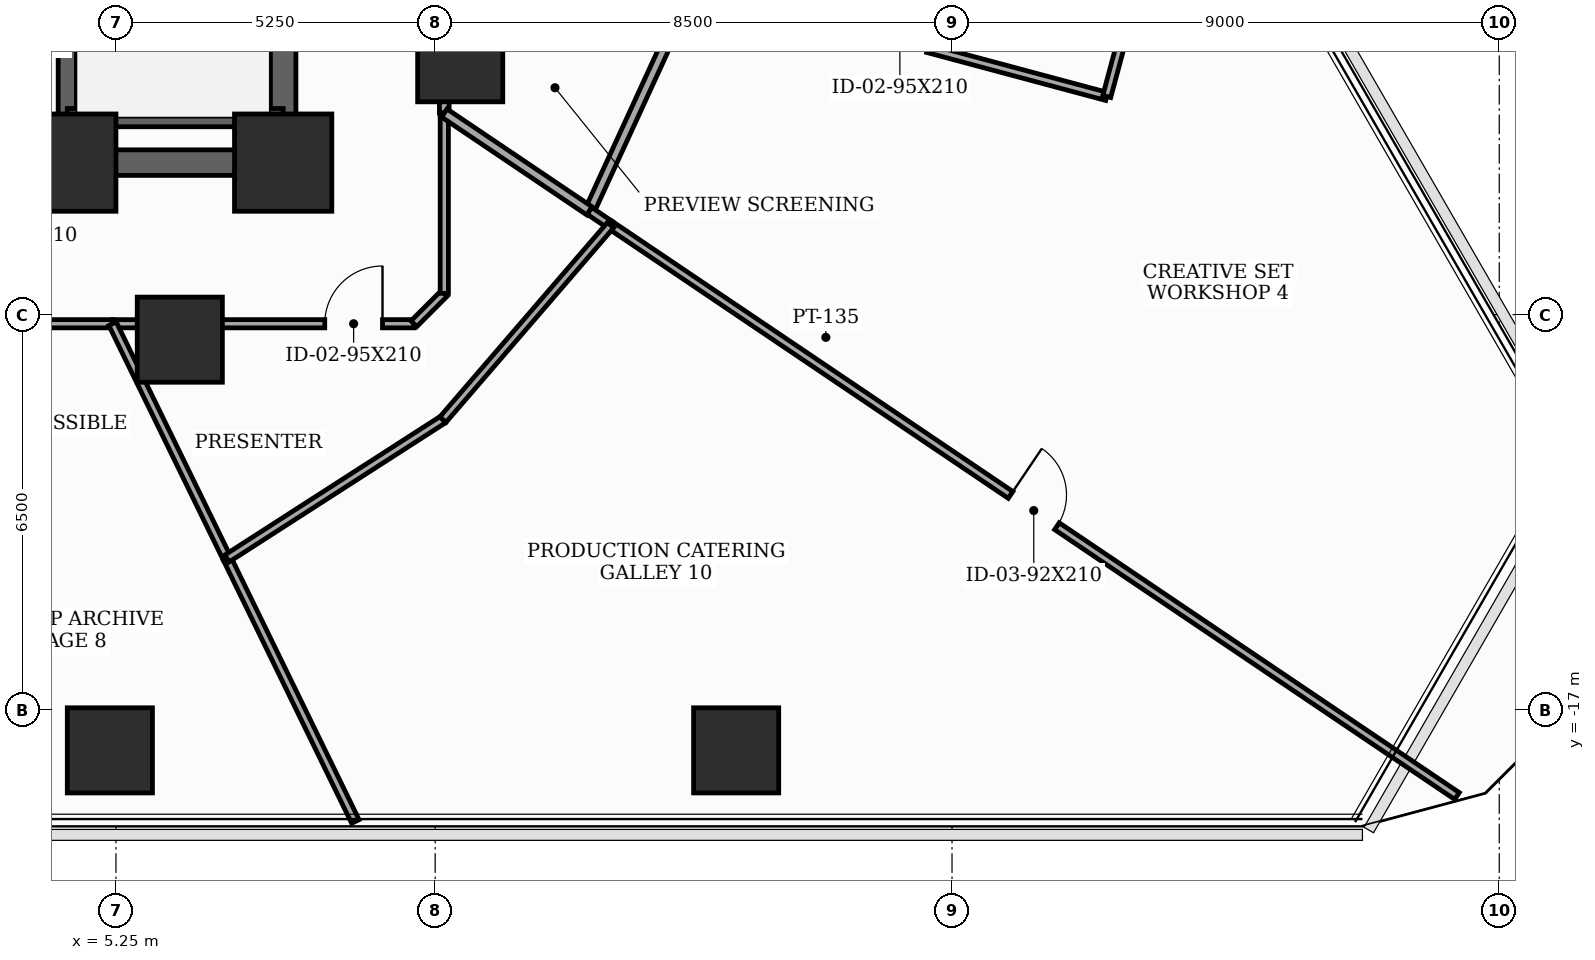
"""IFC4 building model, lengths in metres.
Left out: names, types, materials, properties, quantities, classifications, styles, units other than length and angle.
Written with IfcOpenShell. Run it as: python <this file> out.ifc"""

import sys

from ifc_helpers import new_model, si_unit, direction, frame, frame_2d, origin, origin_2d, place, context, subcontext, project, spatial, rectangle, extrude, element, fill, save


model = new_model("IFC4")
c1 = context("Model", 3, precision=1e-05, world=origin(), true_north=direction((0.0, 1.0)))
c2 = subcontext(c1, "Body", "Model", "MODEL_VIEW")
j1 = project(units=[si_unit("LENGTHUNIT", "METRE"), si_unit("PLANEANGLEUNIT", "RADIAN")], contexts=[c1])
p1 = place(None, origin())
s1 = spatial("IfcSite", under=j1, at=p1, CompositionType="ELEMENT")
p2 = place(p1, origin())
s2 = spatial("IfcBuilding", under=s1, at=p2, CompositionType="ELEMENT")
p3 = place(p2, frame((0.0, 0.0, 40.8)))
s3 = spatial("IfcBuildingStorey", under=s2, at=p3, CompositionType="ELEMENT", Elevation=40.8)
for number, where, z_axis, x_axis in (
    (1, (4.45, -8.0, 0.0), (0.0, 0.0, 1.0), (1.0, 0.0, 0.0)),
    (2, (8.0, -8.0, 0.0), (0.0, 0.0, 1.0), (1.0, 0.0, 0.0)),
):
    element("IfcColumn", number, at=place(p3, frame(where, z_axis=z_axis, x_axis=x_axis)), inside=s3, PredefinedType="COLUMN", context=c2, shape_type="SweptSolid", body=[
        extrude(rectangle(XDim=1.6, YDim=1.6, at=origin_2d()), origin(), (0.0, 0.0, 1.0), 3.7),
    ])
for number, where, z_axis, x_axis in (
    (3, (6.3, -10.912, 0.0), (0.0, 0.0, 1.0), (1.0, 0.0, 0.0)),
    (4, (10.912, -6.3, 0.0), (0.0, 0.0, 1.0), (1.0, 0.0, 0.0)),
    (5, (5.15, -17.667, 0.0), (0.0, 0.0, 1.0), (1.0, 0.0, 0.0)),
    (6, (15.45, -17.667, 0.0), (0.0, 0.0, 1.0), (1.0, 0.0, 0.0)),
):
    element("IfcColumn", number, at=place(p3, frame(where, z_axis=z_axis, x_axis=x_axis)), inside=s3, PredefinedType="COLUMN", context=c2, shape_type="SweptSolid", body=[
        extrude(rectangle(XDim=1.4, YDim=1.4, at=origin_2d()), origin(), (0.0, 0.0, 1.0), 3.7),
    ])
p4 = place(p3, frame((8.0, -8.0, 0.0), z_axis=(0.0, 0.0, 1.0), x_axis=(0.0, 1.0, 0.0)))
e7 = element("IfcWall", 7, at=p4, inside=s3, PredefinedType="SHEAR", context=c2, shape_type="SweptSolid", body=[
    extrude(rectangle(XDim=16.0, YDim=0.42, at=frame_2d((8.0, 0.0))), origin(), (0.0, 0.0, 1.0), 3.5),
])
p5 = place(p4, frame((9.6, 0.0, 0.0)))
e8 = element("IfcOpeningElement", 8, at=p5, cuts=e7, PredefinedType="OPENING", context=c2, shape_type="SweptSolid", body=[
    extrude(rectangle(XDim=1.05, YDim=2.15, at=frame_2d((0.525, 1.075))), frame((0.0, 0.22, 0.0), z_axis=(0.0, -1.0, 0.0), x_axis=(1.0, 0.0, 0.0)), (0.0, 0.0, 1.0), 0.44),
])
p6 = place(p4, frame((14.148, 0.0, 0.0)))
e9 = element("IfcOpeningElement", 9, at=p6, cuts=e7, PredefinedType="OPENING", context=c2, shape_type="SweptSolid", body=[
    extrude(rectangle(XDim=0.85, YDim=2.02, at=frame_2d((0.425, 1.01))), frame((0.0, 0.22, 0.0), z_axis=(0.0, -1.0, 0.0), x_axis=(1.0, 0.0, 0.0)), (0.0, 0.0, 1.0), 0.44),
])
p7 = place(p3, frame((-8.0, -8.0, 0.0), z_axis=(0.0, 0.0, 1.0), x_axis=(1.0, 0.0, 0.0)))
e10 = element("IfcWall", 10, at=p7, inside=s3, PredefinedType="SHEAR", context=c2, shape_type="SweptSolid", body=[
    extrude(rectangle(XDim=16.0, YDim=0.42, at=frame_2d((8.0, 0.0))), origin(), (0.0, 0.0, 1.0), 3.5),
])
p8 = place(p7, frame((4.6, 0.0, 0.0)))
e11 = element("IfcOpeningElement", 11, at=p8, cuts=e10, PredefinedType="OPENING", context=c2, shape_type="SweptSolid", body=[
    extrude(rectangle(XDim=0.95, YDim=2.1, at=frame_2d((0.475, 1.05))), frame((0.0, 0.22, 0.0), z_axis=(0.0, -1.0, 0.0), x_axis=(1.0, 0.0, 0.0)), (0.0, 0.0, 1.0), 0.44),
])
p9 = place(p7, frame((7.52, 0.0, 0.0)))
e12 = element("IfcOpeningElement", 12, at=p9, cuts=e10, PredefinedType="OPENING", context=c2, shape_type="SweptSolid", body=[
    extrude(rectangle(XDim=0.95, YDim=2.1, at=frame_2d((0.475, 1.05))), frame((0.0, 0.22, 0.0), z_axis=(0.0, -1.0, 0.0), x_axis=(1.0, 0.0, 0.0)), (0.0, 0.0, 1.0), 0.44),
])
p10 = place(p7, frame((10.45, 0.0, 0.0)))
e13 = element("IfcOpeningElement", 13, at=p10, cuts=e10, PredefinedType="OPENING", context=c2, shape_type="SweptSolid", body=[
    extrude(rectangle(XDim=0.95, YDim=2.1, at=frame_2d((0.475, 1.05))), frame((0.0, 0.22, 0.0), z_axis=(0.0, -1.0, 0.0), x_axis=(1.0, 0.0, 0.0)), (0.0, 0.0, 1.0), 0.44),
])
p11 = place(p3, frame((4.45, -7.79, 0.0), z_axis=(0.0, 0.0, 1.0), x_axis=(0.0, 1.0, 0.0)))
e14 = element("IfcWall", 14, at=p11, inside=s3, PredefinedType="SHEAR", context=c2, shape_type="SweptSolid", body=[
    extrude(rectangle(XDim=15.58, YDim=0.3, at=frame_2d((7.79, 0.0))), origin(), (0.0, 0.0, 1.0), 3.5),
])
p12 = place(p3, frame((4.45, -7.26, 0.0), z_axis=(0.0, 0.0, 1.0), x_axis=(1.0, 0.0, 0.0)))
e15 = element("IfcWall", 15, at=p12, inside=s3, PredefinedType="SHEAR", context=c2, shape_type="SweptSolid", body=[
    extrude(rectangle(XDim=3.55, YDim=0.3, at=frame_2d((1.775, 0.0))), origin(), (0.0, 0.0, 1.0), 3.5),
])
p13 = place(p3, frame((10.65, -7.184, 0.0), z_axis=(0.0, 0.0, 1.0), x_axis=(0.0, 1.0, 0.0)))
e16 = element("IfcWall", 16, at=p13, inside=s3, PredefinedType="PARTITIONING", context=c2, shape_type="SweptSolid", body=[
    extrude(rectangle(XDim=3.192, YDim=0.16, at=frame_2d((1.596, 0.0))), origin(), (0.0, 0.0, 1.0), 2.785),
])
p14 = place(p3, frame((14.74, -5.088, 0.0), z_axis=(0.0, 0.0, 1.0), x_axis=(0.965895912523, -0.258930659002, 0.0)))
e17 = element("IfcWall", 17, at=p14, inside=s3, PredefinedType="PARTITIONING", context=c2, shape_type="SweptSolid", body=[
    extrude(rectangle(XDim=7.045, YDim=0.135, at=frame_2d((3.522, 0.0))), origin(), (0.0, 0.0, 1.0), 2.935),
])
p15 = place(p14, frame((3.048, 0.0, 0.0)))
e18 = element("IfcOpeningElement", 18, at=p15, cuts=e17, PredefinedType="OPENING", context=c2, shape_type="SweptSolid", body=[
    extrude(rectangle(XDim=0.95, YDim=2.1, at=frame_2d((0.475, 1.05))), frame((0.0, 0.077, 0.0), z_axis=(0.0, -1.0, 0.0), x_axis=(1.0, 0.0, 0.0)), (0.0, 0.0, 1.0), 0.155),
])
p16 = place(p3, frame((21.545, -6.912, 0.0), z_axis=(0.0, 0.0, 1.0), x_axis=(0.259105843213, 0.965848933329, 0.0)))
e19 = element("IfcWall", 19, at=p16, inside=s3, PredefinedType="PARTITIONING", context=c2, shape_type="SweptSolid", body=[
    extrude(rectangle(XDim=2.2, YDim=0.135, at=frame_2d((1.1, 0.0))), origin(), (0.0, 0.0, 1.0), 2.935),
])
p17 = place(p3, frame((2.45, -10.65, 0.0), z_axis=(0.0, 0.0, 1.0), x_axis=(1.0, 0.0, 0.0)))
e20 = element("IfcWall", 20, at=p17, inside=s3, PredefinedType="PARTITIONING", context=c2, shape_type="SweptSolid", body=[
    extrude(rectangle(XDim=2.744, YDim=0.135, at=frame_2d((1.372, 0.0))), origin(), (0.0, 0.0, 1.0), 3.5),
])
p18 = place(p17, frame((0.568, 0.0, 0.0)))
e21 = element("IfcOpeningElement", 21, at=p18, cuts=e20, PredefinedType="OPENING", context=c2, shape_type="SweptSolid", body=[
    extrude(rectangle(XDim=0.95, YDim=2.1, at=frame_2d((0.475, 1.05))), frame((0.0, 0.077, 0.0), z_axis=(0.0, -1.0, 0.0), x_axis=(1.0, 0.0, 0.0)), (0.0, 0.0, 1.0), 0.155),
])
p19 = place(p3, frame((5.194, -10.65, 0.0), z_axis=(0.0, 0.0, 1.0), x_axis=(1.0, 0.0, 0.0)))
e22 = element("IfcWall", 22, at=p19, inside=s3, PredefinedType="PARTITIONING", context=c2, shape_type="SweptSolid", body=[
    extrude(rectangle(XDim=4.956, YDim=0.135, at=frame_2d((2.478, 0.0))), origin(), (0.0, 0.0, 1.0), 2.785),
])
p20 = place(p19, frame((3.49, 0.0, 0.0)))
e23 = element("IfcOpeningElement", 23, at=p20, cuts=e22, PredefinedType="OPENING", context=c2, shape_type="SweptSolid", body=[
    extrude(rectangle(XDim=0.95, YDim=2.1, at=frame_2d((0.475, 1.05))), frame((0.0, 0.077, 0.0), z_axis=(0.0, -1.0, 0.0), x_axis=(1.0, 0.0, 0.0)), (0.0, 0.0, 1.0), 0.155),
])
p21 = place(p3, frame((10.15, -10.65, 0.0), z_axis=(0.0, 0.0, 1.0), x_axis=(0.707106781187, 0.707106781187, 0.0)))
e24 = element("IfcWall", 24, at=p21, inside=s3, PredefinedType="PARTITIONING", context=c2, shape_type="SweptSolid", body=[
    extrude(rectangle(XDim=0.707, YDim=0.135, at=frame_2d((0.354, 0.0))), origin(), (0.0, 0.0, 1.0), 3.5),
])
p22 = place(p3, frame((10.65, -10.15, 0.0), z_axis=(0.0, 0.0, 1.0), x_axis=(0.0, 1.0, 0.0)))
e25 = element("IfcWall", 25, at=p22, inside=s3, PredefinedType="PARTITIONING", context=c2, shape_type="SweptSolid", body=[
    extrude(rectangle(XDim=2.966, YDim=0.135, at=frame_2d((1.483, 0.0))), origin(), (0.0, 0.0, 1.0), 3.5),
])
p23 = place(p3, frame((13.038, -8.794, 0.0), z_axis=(0.0, 0.0, 1.0), x_axis=(0.417322480709, 0.908758464662, 0.0)))
e26 = element("IfcWall", 26, at=p23, inside=s3, PredefinedType="PARTITIONING", context=c2, shape_type="SweptSolid", body=[
    extrude(rectangle(XDim=4.078, YDim=0.16, at=frame_2d((2.039, 0.0))), origin(), (0.0, 0.0, 1.0), 3.5),
])
p24 = place(p3, frame((10.65, -7.184, 0.0), z_axis=(0.0, 0.0, 1.0), x_axis=(0.829196392101, -0.558957371654, 0.0)))
e27 = element("IfcWall", 27, at=p24, inside=s3, PredefinedType="PARTITIONING", context=c2, shape_type="SweptSolid", body=[
    extrude(rectangle(XDim=2.88, YDim=0.16, at=frame_2d((1.44, 0.0))), origin(), (0.0, 0.0, 1.0), 3.5),
])
p25 = place(p3, frame((13.038, -8.794, 0.0), z_axis=(0.0, 0.0, 1.0), x_axis=(0.828163729679, -0.560486250361, 0.0)))
e28 = element("IfcWall", 28, at=p25, inside=s3, PredefinedType="PARTITIONING", context=c2, shape_type="SweptSolid", body=[
    extrude(rectangle(XDim=0.418, YDim=0.135, at=frame_2d((0.209, 0.0))), origin(), (0.0, 0.0, 1.0), 3.5),
])
p26 = place(p3, frame((13.384, -9.028, 0.0), z_axis=(0.0, 0.0, 1.0), x_axis=(0.829042972493, -0.55918489765, 0.0)))
e29 = element("IfcWall", 29, at=p26, inside=s3, PredefinedType="PARTITIONING", context=c2, shape_type="SweptSolid", body=[
    extrude(rectangle(XDim=16.791, YDim=0.135, at=frame_2d((8.396, 0.0))), origin(), (0.0, 0.0, 1.0), 2.935),
])
p27 = place(p26, frame((7.936, 0.0, 0.0)))
e30 = element("IfcOpeningElement", 30, at=p27, cuts=e29, PredefinedType="OPENING", context=c2, shape_type="SweptSolid", body=[
    extrude(rectangle(XDim=0.92, YDim=2.1, at=frame_2d((0.46, 1.05))), frame((0.0, 0.077, 0.0), z_axis=(0.0, -1.0, 0.0), x_axis=(1.0, 0.0, 0.0)), (0.0, 0.0, 1.0), 0.155),
])
p28 = place(p3, frame((7.077, -14.51, 0.0), z_axis=(0.0, 0.0, 1.0), x_axis=(-0.438392272504, 0.898783742292, 0.0)))
e31 = element("IfcWall", 31, at=p28, inside=s3, PredefinedType="PARTITIONING", context=c2, shape_type="SweptSolid", body=[
    extrude(rectangle(XDim=4.295, YDim=0.135, at=frame_2d((2.147, 0.0))), origin(), (0.0, 0.0, 1.0), 2.675),
])
p29 = place(p3, frame((9.188, -18.837, 0.0), z_axis=(0.0, 0.0, 1.0), x_axis=(-0.438408644876, 0.898775756292, 0.0)))
e32 = element("IfcWall", 32, at=p29, inside=s3, PredefinedType="PARTITIONING", context=c2, shape_type="SweptSolid", body=[
    extrude(rectangle(XDim=4.814, YDim=0.135, at=frame_2d((2.407, 0.0))), origin(), (0.0, 0.0, 1.0), 2.925),
])
p30 = place(p3, frame((7.077, -14.51, 0.0), z_axis=(0.0, 0.0, 1.0), x_axis=(0.841056333741, 0.540947542258, 0.0)))
e33 = element("IfcWall", 33, at=p30, inside=s3, PredefinedType="PARTITIONING", context=c2, shape_type="SweptSolid", body=[
    extrude(rectangle(XDim=4.222, YDim=0.135, at=frame_2d((2.111, 0.0))), origin(), (0.0, 0.0, 1.0), 2.685),
])
p31 = place(p3, frame((10.628, -12.226, 0.0), z_axis=(0.0, 0.0, 1.0), x_axis=(0.652832083446, 0.757502654004, 0.0)))
e34 = element("IfcWall", 34, at=p31, inside=s3, PredefinedType="PARTITIONING", context=c2, shape_type="SweptSolid", body=[
    extrude(rectangle(XDim=4.222, YDim=0.135, at=frame_2d((2.111, 0.0))), origin(), (0.0, 0.0, 1.0), 3.5),
])
p32 = place(p20, origin())
e35 = element("IfcDoor", 35, at=p32, inside=s3, OperationType="SINGLE_SWING_RIGHT", PredefinedType="DOOR", context=c2, shape_type="SweptSolid", body=[
    extrude(rectangle(XDim=0.95, YDim=2.1, at=frame_2d((0.475, 1.05))), frame((0.0, 0.025, 0.0), z_axis=(0.0, -1.0, 0.0), x_axis=(1.0, 0.0, 0.0)), (0.0, 0.0, 1.0), 0.05),
])
fill(e23, e35)
p33 = place(p27, origin())
e36 = element("IfcDoor", 36, at=p33, inside=s3, OperationType="SINGLE_SWING_LEFT", PredefinedType="DOOR", context=c2, shape_type="SweptSolid", body=[
    extrude(rectangle(XDim=0.92, YDim=2.1, at=frame_2d((0.46, 1.05))), frame((0.0, 0.025, 0.0), z_axis=(0.0, -1.0, 0.0), x_axis=(1.0, 0.0, 0.0)), (0.0, 0.0, 1.0), 0.05),
])
fill(e30, e36)
save(model, sys.argv[1])
